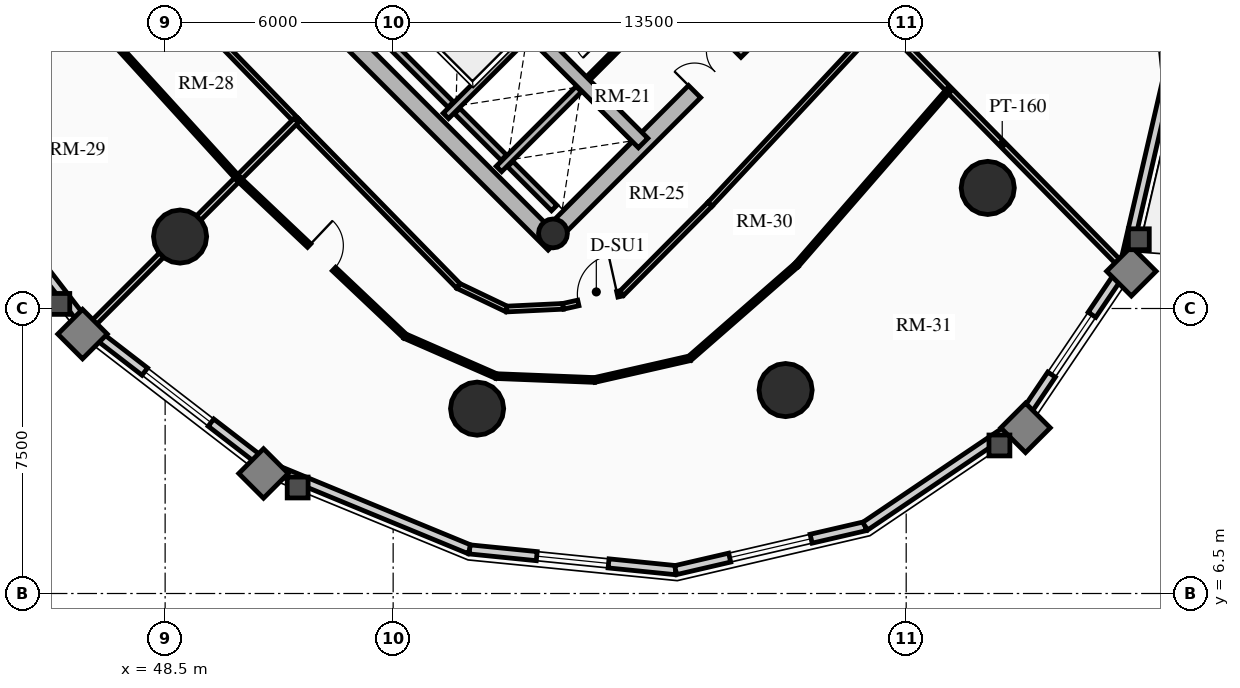
"""IFC4 building model, lengths in metres.
Left out: names, types, materials, properties, quantities, classifications, styles, units other than length and angle.
Written with IfcOpenShell. Run it as: python <this file> out.ifc"""

import sys

from ifc_helpers import new_model, si_unit, direction, frame, frame_2d, origin, origin_2d, place, context, subcontext, project, spatial, rectangle, circle, hollow_circle, extrude, source, transform, mapped, element, fill, save


model = new_model("IFC4")
c1 = context("Model", 3, precision=1e-05, world=origin(), true_north=direction((0.0, 1.0)))
c2 = subcontext(c1, "Body", "Model", "MODEL_VIEW")
j1 = project(units=[si_unit("LENGTHUNIT", "METRE"), si_unit("PLANEANGLEUNIT", "RADIAN")], contexts=[c1])
p1 = place(None, origin())
s1 = spatial("IfcSite", under=j1, at=p1, CompositionType="ELEMENT")
p2 = place(p1, origin())
s2 = spatial("IfcBuilding", under=s1, at=p2, CompositionType="ELEMENT")
p3 = place(p2, frame((0.0, 0.0, 93.43)))
s3 = spatial("IfcBuildingStorey", under=s2, at=p3, CompositionType="ELEMENT", Elevation=93.43)
p4 = place(p3, frame((58.737, 15.697, 0.0), z_axis=(0.0, 0.0, 1.0), x_axis=(-0.707106781187, 0.707106781187, 0.0)))
e1 = element("IfcWall", 1, at=p4, inside=s3, PredefinedType="SHEAR", context=c2, shape_type="SweptSolid", body=[
    extrude(rectangle(XDim=14.2, YDim=0.45, at=frame_2d((7.1, 0.0))), origin(), (0.0, 0.0, 1.0), 2.91),
])
p5 = place(p3, frame((58.578, 15.856, 0.0), z_axis=(0.0, 0.0, 1.0), x_axis=(0.707106781187, 0.707106781187, 0.0)))
e2 = element("IfcWall", 2, at=p5, inside=s3, PredefinedType="SHEAR", context=c2, shape_type="SweptSolid", body=[
    extrude(rectangle(XDim=10.7, YDim=0.45, at=frame_2d((5.35, 0.0))), origin(), (0.0, 0.0, 1.0), 2.91),
])
m1 = source(origin(), c2, "Body", "SweptSolid", [
    extrude(rectangle(XDim=1.5, YDim=2.02, at=frame_2d((0.75, 1.01))), frame((0.0, 0.235, 0.0), z_axis=(0.0, -1.0, 0.0), x_axis=(1.0, 0.0, 0.0)), (0.0, 0.0, 1.0), 0.47),
])
p6 = place(p5, frame((5.45, 0.0, 0.0)))
e3 = element("IfcOpeningElement", 3, at=p6, cuts=e2, PredefinedType="OPENING", context=c2, shape_type="MappedRepresentation", body=[
    mapped(m1, transform((0.0, 0.0, 0.0), x_axis=(1.0, 0.0, 0.0), y_axis=(0.0, 1.0, 0.0), z_axis=(0.0, 0.0, 1.0), scale=1.0)),
])
p7 = place(p3, frame((61.078, 18.355, 0.0), z_axis=(0.0, 0.0, 1.0), x_axis=(-0.707106781187, 0.707106781187, 0.0)))
e4 = element("IfcWall", 4, at=p7, inside=s3, PredefinedType="SHEAR", context=c2, shape_type="SweptSolid", body=[
    extrude(rectangle(XDim=13.75, YDim=0.35, at=frame_2d((6.875, 0.0))), origin(), (0.0, 0.0, 1.0), 2.91),
])
m2 = source(origin(), c2, "Body", "SweptSolid", [
    extrude(rectangle(XDim=1.1, YDim=2.015, at=frame_2d((0.55, 1.007))), frame((0.0, 0.185, 0.0), z_axis=(0.0, -1.0, 0.0), x_axis=(1.0, 0.0, 0.0)), (0.0, 0.0, 1.0), 0.37),
])
p8 = place(p7, frame((4.875, 0.0, 0.0)))
e5 = element("IfcOpeningElement", 5, at=p8, cuts=e4, PredefinedType="OPENING", context=c2, shape_type="MappedRepresentation", body=[
    mapped(m2, transform((0.0, 0.0, 0.0), x_axis=(1.0, 0.0, 0.0), y_axis=(0.0, 1.0, 0.0), z_axis=(0.0, 0.0, 1.0), scale=1.0)),
])
m3 = source(origin(), c2, "Body", "SweptSolid", [
    extrude(rectangle(XDim=1.15, YDim=2.02, at=frame_2d((0.575, 1.01))), frame((0.0, 0.185, 0.0), z_axis=(0.0, -1.0, 0.0), x_axis=(1.0, 0.0, 0.0)), (0.0, 0.0, 1.0), 0.37),
])
p9 = place(p7, frame((7.295, 0.0, 0.0)))
e6 = element("IfcOpeningElement", 6, at=p9, cuts=e4, PredefinedType="OPENING", context=c2, shape_type="MappedRepresentation", body=[
    mapped(m3, transform((0.0, 0.0, 0.0), x_axis=(1.0, 0.0, 0.0), y_axis=(0.0, 1.0, 0.0), z_axis=(0.0, 0.0, 1.0), scale=1.0)),
])
p10 = place(p3, frame((58.706, 15.976, 0.0), z_axis=(0.0, 0.0, 1.0), x_axis=(0.707106781187, 0.707106781187, 0.0)))
e7 = element("IfcColumn", 7, at=p10, inside=s3, PredefinedType="COLUMN", context=c2, shape_type="SweptSolid", body=[
    extrude(hollow_circle(Radius=0.38, WallThickness=0.032, at=origin_2d()), origin(), (0.0, 0.0, 1.0), 2.91),
])
for number, where, z_axis, x_axis in (
    (8, (48.893, 15.893, 0.0), (0.0, 0.0, 1.0), (1.0, 0.0, 0.0)),
    (9, (56.709, 11.365, 0.0), (0.0, 0.0, 1.0), (1.0, 0.0, 0.0)),
    (10, (64.827, 11.854, 0.0), (0.0, 0.0, 1.0), (1.0, 0.0, 0.0)),
    (11, (70.146, 17.173, 0.0), (0.0, 0.0, 1.0), (1.0, 0.0, 0.0)),
):
    element("IfcColumn", number, at=place(p3, frame(where, z_axis=z_axis, x_axis=x_axis)), inside=s3, PredefinedType="USERDEFINED", context=c2, shape_type="SweptSolid", body=[
        extrude(circle(Radius=0.7, at=origin_2d()), origin(), (0.0, 0.0, 1.0), 2.91),
    ])
p11 = place(p3, frame((46.483, 13.483, 0.0), z_axis=(0.0, 0.0, 1.0), x_axis=(-0.61054437102, 0.791982052206, 0.0)))
e12 = element("IfcWall", 12, at=p11, inside=s3, PredefinedType="SOLIDWALL", context=c2, shape_type="SweptSolid", body=[
    extrude(rectangle(XDim=5.942, YDim=0.24, at=frame_2d((2.971, 0.0))), origin(), (0.0, 0.0, 1.0), 2.179),
])
p12 = place(p3, frame((51.189, 9.855, 0.0), z_axis=(0.0, 0.0, 1.0), x_axis=(-0.791982052206, 0.61054437102, 0.0)))
e13 = element("IfcWall", 13, at=p12, inside=s3, PredefinedType="SOLIDWALL", context=c2, shape_type="SweptSolid", body=[
    extrude(rectangle(XDim=5.942, YDim=0.24, at=frame_2d((2.971, 0.0))), origin(), (0.0, 0.0, 1.0), 2.179),
])
m4 = source(origin(), c2, "Body", "SweptSolid", [
    extrude(rectangle(XDim=2.2, YDim=1.35, at=frame_2d((1.1, 0.675))), frame((0.0, 0.13, 0.0), z_axis=(0.0, -1.0, 0.0), x_axis=(1.0, 0.0, 0.0)), (0.0, 0.0, 1.0), 0.26),
])
p13 = place(p12, frame((1.871, 0.0, 0.65)))
e14 = element("IfcOpeningElement", 14, at=p13, cuts=e13, PredefinedType="OPENING", context=c2, shape_type="MappedRepresentation", body=[
    mapped(m4, transform((0.0, 0.0, 0.0), x_axis=(1.0, 0.0, 0.0), y_axis=(0.0, 1.0, 0.0), z_axis=(0.0, 0.0, 1.0), scale=1.0)),
])
p14 = place(p3, frame((56.513, 7.661, 0.0), z_axis=(0.0, 0.0, 1.0), x_axis=(-0.924563909604, 0.381027003055, 0.0)))
e15 = element("IfcWall", 15, at=p14, inside=s3, PredefinedType="SOLIDWALL", context=c2, shape_type="SweptSolid", body=[
    extrude(rectangle(XDim=5.758, YDim=0.24, at=frame_2d((2.879, 0.0))), origin(), (0.0, 0.0, 1.0), 2.179),
])
p15 = place(p3, frame((61.933, 7.115, 0.0), z_axis=(0.0, 0.0, 1.0), x_axis=(-0.994971754311, 0.10015591906, 0.0)))
e16 = element("IfcWall", 16, at=p15, inside=s3, PredefinedType="SOLIDWALL", context=c2, shape_type="SweptSolid", body=[
    extrude(rectangle(XDim=5.448, YDim=0.24, at=frame_2d((2.724, 0.0))), origin(), (0.0, 0.0, 1.0), 2.179),
])
m5 = source(origin(), c2, "Body", "SweptSolid", [
    extrude(rectangle(XDim=1.9, YDim=1.35, at=frame_2d((0.95, 0.675))), frame((0.0, 0.13, 0.0), z_axis=(0.0, -1.0, 0.0), x_axis=(1.0, 0.0, 0.0)), (0.0, 0.0, 1.0), 0.26),
])
p16 = place(p15, frame((1.774, 0.0, 0.65)))
e17 = element("IfcOpeningElement", 17, at=p16, cuts=e16, PredefinedType="OPENING", context=c2, shape_type="MappedRepresentation", body=[
    mapped(m5, transform((0.0, 0.0, 0.0), x_axis=(1.0, 0.0, 0.0), y_axis=(0.0, 1.0, 0.0), z_axis=(0.0, 0.0, 1.0), scale=1.0)),
])
p17 = place(p3, frame((66.92, 8.271, 0.0), z_axis=(0.0, 0.0, 1.0), x_axis=(-0.974165631126, -0.225834725257, 0.0)))
e18 = element("IfcWall", 18, at=p17, inside=s3, PredefinedType="SOLIDWALL", context=c2, shape_type="SweptSolid", body=[
    extrude(rectangle(XDim=5.119, YDim=0.24, at=frame_2d((2.56, 0.0))), origin(), (0.0, 0.0, 1.0), 2.179),
])
p18 = place(p17, frame((1.459, 0.0, 0.65)))
e19 = element("IfcOpeningElement", 19, at=p18, cuts=e18, PredefinedType="OPENING", context=c2, shape_type="MappedRepresentation", body=[
    mapped(m4, transform((0.0, 0.0, 0.0), x_axis=(1.0, 0.0, 0.0), y_axis=(0.0, 1.0, 0.0), z_axis=(0.0, 0.0, 1.0), scale=1.0)),
])
p19 = place(p3, frame((70.985, 11.015, 0.0), z_axis=(0.0, 0.0, 1.0), x_axis=(-0.828781148131, -0.559572880421, 0.0)))
e20 = element("IfcWall", 20, at=p19, inside=s3, PredefinedType="SOLIDWALL", context=c2, shape_type="SweptSolid", body=[
    extrude(rectangle(XDim=4.905, YDim=0.24, at=frame_2d((2.452, 0.0))), origin(), (0.0, 0.0, 1.0), 2.179),
])
p20 = place(p3, frame((73.729, 15.08, 0.0), z_axis=(0.0, 0.0, 1.0), x_axis=(-0.559572880421, -0.828781148131, 0.0)))
e21 = element("IfcWall", 21, at=p20, inside=s3, PredefinedType="SOLIDWALL", context=c2, shape_type="SweptSolid", body=[
    extrude(rectangle(XDim=4.905, YDim=0.24, at=frame_2d((2.452, 0.0))), origin(), (0.0, 0.0, 1.0), 2.179),
])
p21 = place(p20, frame((1.502, 0.0, 0.65)))
e22 = element("IfcOpeningElement", 22, at=p21, cuts=e21, PredefinedType="OPENING", context=c2, shape_type="MappedRepresentation", body=[
    mapped(m5, transform((0.0, 0.0, 0.0), x_axis=(1.0, 0.0, 0.0), y_axis=(0.0, 1.0, 0.0), z_axis=(0.0, 0.0, 1.0), scale=1.0)),
])
p22 = place(p3, frame((74.885, 20.067, 0.0), z_axis=(0.0, 0.0, 1.0), x_axis=(-0.225834725257, -0.974165631126, 0.0)))
e23 = element("IfcWall", 23, at=p22, inside=s3, PredefinedType="SOLIDWALL", context=c2, shape_type="SweptSolid", body=[
    extrude(rectangle(XDim=5.119, YDim=0.24, at=frame_2d((2.56, 0.0))), origin(), (0.0, 0.0, 1.0), 2.179),
])
p23 = place(p3, frame((74.339, 25.487, 0.0), z_axis=(0.0, 0.0, 1.0), x_axis=(0.10015591906, -0.994971754311, 0.0)))
e24 = element("IfcWall", 24, at=p23, inside=s3, PredefinedType="SOLIDWALL", context=c2, shape_type="SweptSolid", body=[
    extrude(rectangle(XDim=5.448, YDim=0.24, at=frame_2d((2.724, 0.0))), origin(), (0.0, 0.0, 1.0), 2.179),
])
p24 = place(p23, frame((1.774, 0.0, 0.65)))
e25 = element("IfcOpeningElement", 25, at=p24, cuts=e24, PredefinedType="OPENING", context=c2, shape_type="MappedRepresentation", body=[
    mapped(m5, transform((0.0, 0.0, 0.0), x_axis=(1.0, 0.0, 0.0), y_axis=(0.0, 1.0, 0.0), z_axis=(0.0, 0.0, 1.0), scale=1.0)),
])
p25 = place(p3, frame((55.888, 19.069, 0.0), z_axis=(0.0, 0.0, 1.0), x_axis=(0.707106781187, 0.707106781187, 0.0)))
e26 = element("IfcWall", 26, at=p25, inside=s3, PredefinedType="SHEAR", context=c2, shape_type="SweptSolid", body=[
    extrude(rectangle(XDim=2.97, YDim=0.2, at=frame_2d((1.485, 0.0))), origin(), (0.0, 0.0, 1.0), 2.91),
])
p26 = place(p3, frame((56.015, 19.366, 0.0), z_axis=(0.0, 0.0, 1.0), x_axis=(-0.707106781187, 0.707106781187, 0.0)))
e27 = element("IfcWall", 27, at=p26, inside=s3, PredefinedType="SHEAR", context=c2, shape_type="SweptSolid", body=[
    extrude(rectangle(XDim=2.44, YDim=0.2, at=frame_2d((1.22, 0.0))), origin(), (0.0, 0.0, 1.0), 2.91),
])
p27 = place(p3, frame((57.284, 17.673, 0.0), z_axis=(0.0, 0.0, 1.0), x_axis=(0.707147878904, 0.70706568108, 0.0)))
e28 = element("IfcWall", 28, at=p27, inside=s3, PredefinedType="SHEAR", context=c2, shape_type="SweptSolid", body=[
    extrude(rectangle(XDim=2.97, YDim=0.2, at=frame_2d((1.485, 0.0))), origin(), (0.0, 0.0, 1.0), 2.91),
])
p28 = place(p3, frame((57.412, 17.97, 0.0), z_axis=(0.0, 0.0, 1.0), x_axis=(-0.707106781187, 0.707106781187, 0.0)))
e29 = element("IfcWall", 29, at=p28, inside=s3, PredefinedType="SHEAR", context=c2, shape_type="SweptSolid", body=[
    extrude(rectangle(XDim=1.735, YDim=0.2, at=frame_2d((0.867, 0.0))), origin(), (0.0, 0.0, 1.0), 2.91),
])
p29 = place(p3, frame((58.737, 16.644, 0.0), z_axis=(0.0, 0.0, 1.0), x_axis=(-0.707032117043, 0.707181437447, 0.0)))
e30 = element("IfcWall", 30, at=p29, inside=s3, PredefinedType="SHEAR", context=c2, shape_type="SweptSolid", body=[
    extrude(rectangle(XDim=1.635, YDim=0.2, at=frame_2d((0.817, 0.0))), origin(), (0.0, 0.0, 1.0), 2.91),
])
p30 = place(p3, frame((59.643, 20.066, 0.0), z_axis=(0.0, 0.0, 1.0), x_axis=(0.707106781187, 0.707106781187, 0.0)))
e31 = element("IfcWall", 31, at=p30, inside=s3, PredefinedType="PARTITIONING", context=c2, shape_type="SweptSolid", body=[
    extrude(rectangle(XDim=1.1, YDim=0.125, at=frame_2d((0.55, 0.0))), origin(), (0.0, 0.0, 1.0), 2.655),
])
p31 = place(p3, frame((47.786, 23.242, 0.0), z_axis=(0.0, 0.0, 1.0), x_axis=(0.696183456981, -0.717863910659, 0.0)))
e32 = element("IfcWall", 32, at=p31, inside=s3, PredefinedType="PARTITIONING", context=c2, shape_type="SweptSolid", body=[
    extrude(rectangle(XDim=5.979, YDim=0.15, at=frame_2d((2.99, 0.0))), origin(), (0.0, 0.0, 1.0), 2.655),
])
p32 = place(p3, frame((51.949, 18.949, 0.0), z_axis=(0.0, 0.0, 1.0), x_axis=(0.699801520154, -0.714337337951, 0.0)))
e33 = element("IfcWall", 33, at=p32, inside=s3, PredefinedType="PARTITIONING", context=c2, shape_type="SweptSolid", body=[
    extrude(rectangle(XDim=6.097, YDim=0.15, at=frame_2d((3.048, 0.0))), origin(), (0.0, 0.0, 1.0), 2.225),
])
p33 = place(p3, frame((56.216, 14.594, 0.0), z_axis=(0.0, 0.0, 1.0), x_axis=(0.902219207281, -0.431277755064, 0.0)))
e34 = element("IfcWall", 34, at=p33, inside=s3, PredefinedType="PARTITIONING", context=c2, shape_type="SweptSolid", body=[
    extrude(rectangle(XDim=1.41, YDim=0.15, at=frame_2d((0.705, 0.0))), origin(), (0.0, 0.0, 1.0), 2.225),
])
p34 = place(p3, frame((57.488, 13.986, 0.0), z_axis=(0.0, 0.0, 1.0), x_axis=(0.998863298217, 0.047666670476, 0.0)))
e35 = element("IfcWall", 35, at=p34, inside=s3, PredefinedType="PARTITIONING", context=c2, shape_type="SweptSolid", body=[
    extrude(rectangle(XDim=1.485, YDim=0.15, at=frame_2d((0.743, 0.0))), origin(), (0.0, 0.0, 1.0), 2.225),
])
p35 = place(p3, frame((58.971, 14.057, 0.0), z_axis=(0.0, 0.0, 1.0), x_axis=(0.976085233804, 0.217388169756, 0.0)))
e36 = element("IfcWall", 36, at=p35, inside=s3, PredefinedType="PARTITIONING", context=c2, shape_type="SweptSolid", body=[
    extrude(rectangle(XDim=1.581, YDim=0.15, at=frame_2d((0.791, 0.0))), origin(), (0.0, 0.0, 1.0), 2.225),
])
m6 = source(origin(), c2, "Body", "SweptSolid", [
    extrude(rectangle(XDim=1.05, YDim=2.015, at=frame_2d((0.525, 1.007))), frame((0.0, 0.085, 0.0), z_axis=(0.0, -1.0, 0.0), x_axis=(1.0, 0.0, 0.0)), (0.0, 0.0, 1.0), 0.17),
])
p36 = place(p35, frame((0.411, 0.0, 0.0)))
e37 = element("IfcOpeningElement", 37, at=p36, cuts=e36, PredefinedType="OPENING", context=c2, shape_type="MappedRepresentation", body=[
    mapped(m6, transform((0.0, 0.0, 0.0), x_axis=(1.0, 0.0, 0.0), y_axis=(0.0, 1.0, 0.0), z_axis=(0.0, 0.0, 1.0), scale=1.0)),
])
p37 = place(p3, frame((60.515, 14.401, 0.0), z_axis=(0.0, 0.0, 1.0), x_axis=(0.704179607439, 0.710021887316, 0.0)))
e38 = element("IfcWall", 38, at=p37, inside=s3, PredefinedType="PARTITIONING", context=c2, shape_type="SweptSolid", body=[
    extrude(rectangle(XDim=3.301, YDim=0.15, at=frame_2d((1.651, 0.0))), origin(), (0.0, 0.0, 1.0), 2.225),
])
p38 = place(p3, frame((62.839, 16.745, 0.0), z_axis=(0.0, 0.0, 1.0), x_axis=(0.682386779427, 0.73099130177, 0.0)))
e39 = element("IfcWall", 39, at=p38, inside=s3, PredefinedType="PARTITIONING", context=c2, shape_type="SweptSolid", body=[
    extrude(rectangle(XDim=6.6, YDim=0.15, at=frame_2d((3.3, 0.0))), origin(), (0.0, 0.0, 1.0), 2.225),
])
p39 = place(p3, frame((51.949, 18.949, 0.0), z_axis=(0.0, 0.0, 1.0), x_axis=(-0.707106781187, -0.707106781187, 0.0)))
e40 = element("IfcWall", 40, at=p39, inside=s3, PredefinedType="PARTITIONING", context=c2, shape_type="SweptSolid", body=[
    extrude(rectangle(XDim=7.711, YDim=0.16, at=frame_2d((3.855, 0.0))), origin(), (0.0, 0.0, 1.0), 2.179),
])
p40 = place(p3, frame((67.343, 21.569, 0.0), z_axis=(0.0, 0.0, 1.0), x_axis=(0.700899237588, -0.713260302238, 0.0)))
e41 = element("IfcWall", 41, at=p40, inside=s3, PredefinedType="PARTITIONING", context=c2, shape_type="SweptSolid", body=[
    extrude(rectangle(XDim=9.085, YDim=0.16, at=frame_2d((4.543, 0.0))), origin(), (0.0, 0.0, 1.0), 2.179),
])
p41 = place(p3, frame((46.41, 21.83, 0.0), z_axis=(0.0, 0.0, 1.0), x_axis=(0.6732109009, -0.739450527696, 0.0)))
e42 = element("IfcWall", 42, at=p41, inside=s3, PredefinedType="PARTITIONING", context=c2, shape_type="SweptSolid", body=[
    extrude(rectangle(XDim=5.96, YDim=0.125, at=frame_2d((2.98, 0.0))), origin(), (0.0, 0.0, 1.0), 2.655),
])
p42 = place(p3, frame((50.423, 17.423, 0.0), z_axis=(0.0, 0.0, 1.0), x_axis=(0.726497320663, -0.68716929724, 0.0)))
e43 = element("IfcWall", 43, at=p42, inside=s3, PredefinedType="PARTITIONING", context=c2, shape_type="SweptSolid", body=[
    extrude(rectangle(XDim=6.04, YDim=0.125, at=frame_2d((3.02, 0.0))), origin(), (0.0, 0.0, 1.0), 2.225),
])
m7 = source(origin(), c2, "Body", "SweptSolid", [
    extrude(rectangle(XDim=0.9, YDim=2.005, at=frame_2d((0.45, 1.002))), frame((0.0, 0.073, 0.0), z_axis=(0.0, -1.0, 0.0), x_axis=(1.0, 0.0, 0.0)), (0.0, 0.0, 1.0), 0.145),
])
p43 = place(p42, frame((2.57, 0.0, 0.0)))
e44 = element("IfcOpeningElement", 44, at=p43, cuts=e43, PredefinedType="OPENING", context=c2, shape_type="MappedRepresentation", body=[
    mapped(m7, transform((0.0, 0.0, 0.0), x_axis=(1.0, 0.0, 0.0), y_axis=(0.0, 1.0, 0.0), z_axis=(0.0, 0.0, 1.0), scale=1.0)),
])
p44 = place(p3, frame((54.811, 13.272, 0.0), z_axis=(0.0, 0.0, 1.0), x_axis=(0.91625765715, -0.400589447831, 0.0)))
e45 = element("IfcWall", 45, at=p44, inside=s3, PredefinedType="PARTITIONING", context=c2, shape_type="SweptSolid", body=[
    extrude(rectangle(XDim=2.624, YDim=0.125, at=frame_2d((1.312, 0.0))), origin(), (0.0, 0.0, 1.0), 2.225),
])
p45 = place(p3, frame((57.215, 12.221, 0.0), z_axis=(0.0, 0.0, 1.0), x_axis=(0.999225050732, -0.039361122818, 0.0)))
e46 = element("IfcWall", 46, at=p45, inside=s3, PredefinedType="PARTITIONING", context=c2, shape_type="SweptSolid", body=[
    extrude(rectangle(XDim=2.586, YDim=0.125, at=frame_2d((1.293, 0.0))), origin(), (0.0, 0.0, 1.0), 2.655),
])
p46 = place(p3, frame((59.8, 12.119, 0.0), z_axis=(0.0, 0.0, 1.0), x_axis=(0.975045061532, 0.222007044895, 0.0)))
e47 = element("IfcWall", 47, at=p46, inside=s3, PredefinedType="PARTITIONING", context=c2, shape_type="SweptSolid", body=[
    extrude(rectangle(XDim=2.57, YDim=0.125, at=frame_2d((1.285, 0.0))), origin(), (0.0, 0.0, 1.0), 2.225),
])
p47 = place(p3, frame((62.306, 12.689, 0.0), z_axis=(0.0, 0.0, 1.0), x_axis=(0.753127589311, 0.657874482115, 0.0)))
e48 = element("IfcWall", 48, at=p47, inside=s3, PredefinedType="PARTITIONING", context=c2, shape_type="SweptSolid", body=[
    extrude(rectangle(XDim=3.732, YDim=0.125, at=frame_2d((1.866, 0.0))), origin(), (0.0, 0.0, 1.0), 2.225),
])
p48 = place(p3, frame((65.116, 15.145, 0.0), z_axis=(0.0, 0.0, 1.0), x_axis=(0.656272685344, 0.75452379848, 0.0)))
e49 = element("IfcWall", 49, at=p48, inside=s3, PredefinedType="PARTITIONING", context=c2, shape_type="SweptSolid", body=[
    extrude(rectangle(XDim=6.11, YDim=0.125, at=frame_2d((3.055, 0.0))), origin(), (0.0, 0.0, 1.0), 2.225),
])
m8 = source(origin(), c2, "Body", "SweptSolid", [
    extrude(rectangle(XDim=2.2, YDim=1.35, at=frame_2d((1.1, 0.675))), frame((0.0, 0.03, 0.0), z_axis=(0.0, -1.0, 0.0), x_axis=(1.0, 0.0, 0.0)), (0.0, 0.0, 1.0), 0.06),
])
p49 = place(p13, origin())
e50 = element("IfcWindow", 50, at=p49, inside=s3, PartitioningType="DOUBLE_PANEL_VERTICAL", PredefinedType="WINDOW", context=c2, shape_type="MappedRepresentation", body=[
    mapped(m8, transform((0.0, 0.0, 0.0), x_axis=(1.0, 0.0, 0.0), y_axis=(0.0, 1.0, 0.0), z_axis=(0.0, 0.0, 1.0), scale=1.0)),
])
fill(e14, e50)
m9 = source(origin(), c2, "Body", "SweptSolid", [
    extrude(rectangle(XDim=1.9, YDim=1.35, at=frame_2d((0.95, 0.675))), frame((0.0, 0.03, 0.0), z_axis=(0.0, -1.0, 0.0), x_axis=(1.0, 0.0, 0.0)), (0.0, 0.0, 1.0), 0.06),
])
p50 = place(p16, origin())
e51 = element("IfcWindow", 51, at=p50, inside=s3, PartitioningType="DOUBLE_PANEL_VERTICAL", PredefinedType="WINDOW", context=c2, shape_type="MappedRepresentation", body=[
    mapped(m9, transform((0.0, 0.0, 0.0), x_axis=(1.0, 0.0, 0.0), y_axis=(0.0, 1.0, 0.0), z_axis=(0.0, 0.0, 1.0), scale=1.0)),
])
fill(e17, e51)
p51 = place(p18, origin())
e52 = element("IfcWindow", 52, at=p51, inside=s3, PartitioningType="DOUBLE_PANEL_VERTICAL", PredefinedType="WINDOW", context=c2, shape_type="MappedRepresentation", body=[
    mapped(m8, transform((0.0, 0.0, 0.0), x_axis=(1.0, 0.0, 0.0), y_axis=(0.0, 1.0, 0.0), z_axis=(0.0, 0.0, 1.0), scale=1.0)),
])
fill(e19, e52)
p52 = place(p21, origin())
e53 = element("IfcWindow", 53, at=p52, inside=s3, PartitioningType="DOUBLE_PANEL_VERTICAL", PredefinedType="WINDOW", context=c2, shape_type="MappedRepresentation", body=[
    mapped(m9, transform((0.0, 0.0, 0.0), x_axis=(1.0, 0.0, 0.0), y_axis=(0.0, 1.0, 0.0), z_axis=(0.0, 0.0, 1.0), scale=1.0)),
])
fill(e22, e53)
m10 = source(origin(), c2, "Body", "SweptSolid", [
    extrude(rectangle(XDim=1.5, YDim=2.02, at=frame_2d((0.75, 1.01))), frame((0.0, 0.025, 0.0), z_axis=(0.0, -1.0, 0.0), x_axis=(1.0, 0.0, 0.0)), (0.0, 0.0, 1.0), 0.05),
])
p53 = place(p6, origin())
e54 = element("IfcDoor", 54, at=p53, inside=s3, OperationType="DOUBLE_DOOR_SINGLE_SWING", PredefinedType="DOOR", context=c2, shape_type="MappedRepresentation", body=[
    mapped(m10, transform((0.0, 0.0, 0.0), x_axis=(1.0, 0.0, 0.0), y_axis=(0.0, 1.0, 0.0), z_axis=(0.0, 0.0, 1.0), scale=1.0)),
])
fill(e3, e54)
m11 = source(origin(), c2, "Body", "SweptSolid", [
    extrude(rectangle(XDim=1.05, YDim=2.015, at=frame_2d((0.525, 1.007))), frame((0.0, 0.025, 0.0), z_axis=(0.0, -1.0, 0.0), x_axis=(1.0, 0.0, 0.0)), (0.0, 0.0, 1.0), 0.05),
])
p54 = place(p36, origin())
e55 = element("IfcDoor", 55, at=p54, inside=s3, OperationType="SINGLE_SWING_RIGHT", PredefinedType="DOOR", context=c2, shape_type="MappedRepresentation", body=[
    mapped(m11, transform((0.0, 0.0, 0.0), x_axis=(1.0, 0.0, 0.0), y_axis=(0.0, 1.0, 0.0), z_axis=(0.0, 0.0, 1.0), scale=1.0)),
])
fill(e37, e55)
m12 = source(origin(), c2, "Body", "SweptSolid", [
    extrude(rectangle(XDim=0.9, YDim=2.005, at=frame_2d((0.45, 1.002))), frame((0.0, 0.025, 0.0), z_axis=(0.0, -1.0, 0.0), x_axis=(1.0, 0.0, 0.0)), (0.0, 0.0, 1.0), 0.05),
])
p55 = place(p43, origin())
e56 = element("IfcDoor", 56, at=p55, inside=s3, OperationType="SINGLE_SWING_LEFT", PredefinedType="DOOR", context=c2, shape_type="MappedRepresentation", body=[
    mapped(m12, transform((0.0, 0.0, 0.0), x_axis=(1.0, 0.0, 0.0), y_axis=(0.0, 1.0, 0.0), z_axis=(0.0, 0.0, 1.0), scale=1.0)),
])
fill(e44, e56)
save(model, sys.argv[1])
